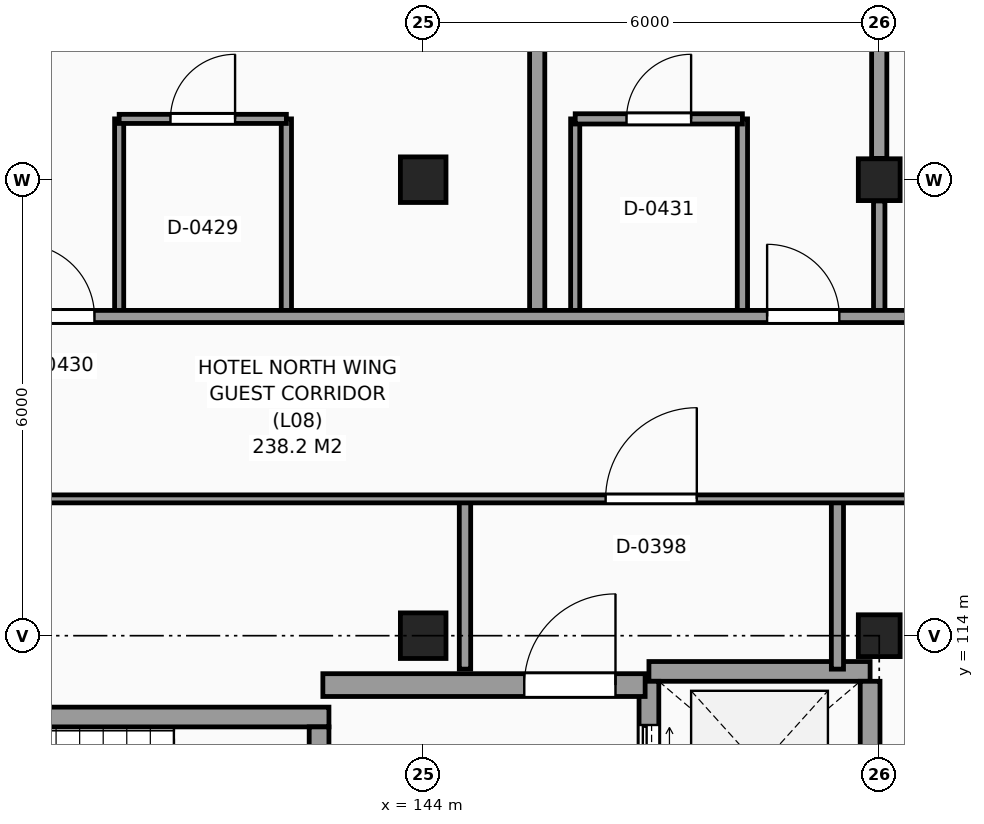
"""IFC4 building model, lengths in metres.
Left out: names, types, materials, properties, quantities, classifications, styles, units other than length and angle.
Written with IfcOpenShell. Run it as: python <this file> out.ifc"""

import sys

from ifc_helpers import new_model, si_unit, direction, frame, frame_2d, origin, origin_2d, place, context, subcontext, project, spatial, rectangle, extrude, element, fill, save


model = new_model("IFC4")
c1 = context("Model", 3, precision=1e-05, world=origin(), true_north=direction((0.0, 1.0)))
c2 = subcontext(c1, "Body", "Model", "MODEL_VIEW")
j1 = project(units=[si_unit("LENGTHUNIT", "METRE"), si_unit("PLANEANGLEUNIT", "RADIAN")], contexts=[c1])
p1 = place(None, origin())
s1 = spatial("IfcSite", under=j1, at=p1, CompositionType="ELEMENT")
p2 = place(p1, origin())
s2 = spatial("IfcBuilding", under=s1, at=p2, CompositionType="ELEMENT")
p3 = place(p2, frame((0.0, 0.0, 34.8)))
s3 = spatial("IfcBuildingStorey", under=s2, at=p3, CompositionType="ELEMENT", Elevation=34.8)
for number, where, z_axis, x_axis in (
    (1, (144.0, 114.0, 0.0), (0.0, 0.0, 1.0), (1.0, 0.0, 0.0)),
    (2, (144.0, 120.0, 0.0), (0.0, 0.0, 1.0), (1.0, 0.0, 0.0)),
):
    element("IfcColumn", number, at=place(p3, frame(where, z_axis=z_axis, x_axis=x_axis)), inside=s3, PredefinedType="COLUMN", context=c2, shape_type="SweptSolid", body=[
        extrude(rectangle(XDim=0.6, YDim=0.6, at=origin_2d()), origin(), (0.0, 0.0, 1.0), 3.3),
    ])
for number, where, z_axis, x_axis in (
    (3, (150.0, 114.0, 0.0), (0.0, 0.0, 1.0), (1.0, 0.0, 0.0)),
    (4, (150.0, 120.0, 0.0), (0.0, 0.0, 1.0), (1.0, 0.0, 0.0)),
):
    element("IfcColumn", number, at=place(p3, frame(where, z_axis=z_axis, x_axis=x_axis)), inside=s3, PredefinedType="COLUMN", context=c2, shape_type="SweptSolid", body=[
        extrude(rectangle(XDim=0.55, YDim=0.55, at=origin_2d()), origin(), (0.0, 0.0, 1.0), 3.3),
    ])
p4 = place(p3, frame((132.04, 112.93, 0.0), z_axis=(0.0, 0.0, 1.0), x_axis=(1.0, 0.0, 0.0)))
e5 = element("IfcWall", 5, at=p4, inside=s3, PredefinedType="SHEAR", context=c2, shape_type="SweptSolid", body=[
    extrude(rectangle(XDim=10.72, YDim=0.26, at=frame_2d((5.36, 0.0))), origin(), (0.0, 0.0, 1.0), 3.3),
])
p5 = place(p3, frame((142.63, 109.2, 0.0), z_axis=(0.0, 0.0, 1.0), x_axis=(0.0, 1.0, 0.0)))
e6 = element("IfcWall", 6, at=p5, inside=s3, PredefinedType="SHEAR", context=c2, shape_type="SweptSolid", body=[
    extrude(rectangle(XDim=3.6, YDim=0.26, at=frame_2d((1.8, 0.0))), origin(), (0.0, 0.0, 1.0), 3.3),
])
p6 = place(p5, frame((1.25, 0.0, 0.0)))
e7 = element("IfcOpeningElement", 7, at=p6, cuts=e6, PredefinedType="OPENING", context=c2, shape_type="SweptSolid", body=[
    extrude(rectangle(XDim=1.1, YDim=2.15, at=frame_2d((0.55, 1.075))), frame((0.0, 0.14, 0.0), z_axis=(0.0, -1.0, 0.0), x_axis=(1.0, 0.0, 0.0)), (0.0, 0.0, 1.0), 0.28),
])
p7 = place(p3, frame((146.97, 113.53, 0.0), z_axis=(0.0, 0.0, 1.0), x_axis=(1.0, 0.0, 0.0)))
e8 = element("IfcWall", 8, at=p7, inside=s3, PredefinedType="SHEAR", context=c2, shape_type="SweptSolid", body=[
    extrude(rectangle(XDim=2.91, YDim=0.26, at=frame_2d((1.455, 0.0))), origin(), (0.0, 0.0, 1.0), 3.3),
])
p8 = place(p3, frame((149.88, 111.15, 0.0), z_axis=(0.0, 0.0, 1.0), x_axis=(0.0, 1.0, 0.0)))
e9 = element("IfcWall", 9, at=p8, inside=s3, PredefinedType="SHEAR", context=c2, shape_type="SweptSolid", body=[
    extrude(rectangle(XDim=2.25, YDim=0.26, at=frame_2d((1.125, 0.0))), origin(), (0.0, 0.0, 1.0), 3.3),
])
p9 = place(p3, frame((146.97, 111.15, 0.0), z_axis=(0.0, 0.0, 1.0), x_axis=(0.0, 1.0, 0.0)))
e10 = element("IfcWall", 10, at=p9, inside=s3, PredefinedType="SHEAR", context=c2, shape_type="SweptSolid", body=[
    extrude(rectangle(XDim=2.25, YDim=0.26, at=frame_2d((1.125, 0.0))), origin(), (0.0, 0.0, 1.0), 3.3),
])
p10 = place(p9, frame((0.575, 0.0, 0.0)))
e11 = element("IfcOpeningElement", 11, at=p10, cuts=e10, PredefinedType="OPENING", context=c2, shape_type="SweptSolid", body=[
    extrude(rectangle(XDim=1.1, YDim=2.2, at=frame_2d((0.55, 1.1))), frame((0.0, 0.14, 0.0), z_axis=(0.0, -1.0, 0.0), x_axis=(1.0, 0.0, 0.0)), (0.0, 0.0, 1.0), 0.28),
])
p11 = place(p3, frame((142.68, 113.35, 0.0), z_axis=(0.0, 0.0, 1.0), x_axis=(1.0, 0.0, 0.0)))
e12 = element("IfcWall", 12, at=p11, inside=s3, PredefinedType="SHEAR", context=c2, shape_type="SweptSolid", body=[
    extrude(rectangle(XDim=4.24, YDim=0.3, at=frame_2d((2.12, 0.0))), origin(), (0.0, 0.0, 1.0), 3.3),
])
p12 = place(p11, frame((2.65, 0.0, 0.0)))
e13 = element("IfcOpeningElement", 13, at=p12, cuts=e12, PredefinedType="OPENING", context=c2, shape_type="SweptSolid", body=[
    extrude(rectangle(XDim=1.2, YDim=2.2, at=frame_2d((0.6, 1.1))), frame((0.0, 0.16, 0.0), z_axis=(0.0, -1.0, 0.0), x_axis=(1.0, 0.0, 0.0)), (0.0, 0.0, 1.0), 0.32),
])
p13 = place(p3, frame((140.0, 118.2, 0.0), z_axis=(0.0, 0.0, 1.0), x_axis=(0.0, 1.0, 0.0)))
e14 = element("IfcWall", 14, at=p13, inside=s3, PredefinedType="PARTITIONING", context=c2, shape_type="SweptSolid", body=[
    extrude(rectangle(XDim=2.6, YDim=0.12, at=frame_2d((1.3, 0.0))), origin(), (0.0, 0.0, 1.0), 3.07),
])
p14 = place(p3, frame((142.2, 118.2, 0.0), z_axis=(0.0, 0.0, 1.0), x_axis=(0.0, 1.0, 0.0)))
e15 = element("IfcWall", 15, at=p14, inside=s3, PredefinedType="PARTITIONING", context=c2, shape_type="SweptSolid", body=[
    extrude(rectangle(XDim=2.6, YDim=0.135, at=frame_2d((1.3, 0.0))), origin(), (0.0, 0.0, 1.0), 3.07),
])
p15 = place(p3, frame((144.55, 113.56, 0.0), z_axis=(0.0, 0.0, 1.0), x_axis=(0.0, 1.0, 0.0)))
e16 = element("IfcWall", 16, at=p15, inside=s3, PredefinedType="PARTITIONING", context=c2, shape_type="SweptSolid", body=[
    extrude(rectangle(XDim=2.24, YDim=0.15, at=frame_2d((1.12, 0.0))), origin(), (0.0, 0.0, 1.0), 3.07),
])
p16 = place(p3, frame((145.5, 118.2, 0.0), z_axis=(0.0, 0.0, 1.0), x_axis=(0.0, 1.0, 0.0)))
e17 = element("IfcWall", 17, at=p16, inside=s3, PredefinedType="PARTITIONING", context=c2, shape_type="SweptSolid", body=[
    extrude(rectangle(XDim=7.545, YDim=0.2, at=frame_2d((3.772, 0.0))), origin(), (0.0, 0.0, 1.0), 3.07),
])
p17 = place(p3, frame((146.0, 118.2, 0.0), z_axis=(0.0, 0.0, 1.0), x_axis=(0.0, 1.0, 0.0)))
e18 = element("IfcWall", 18, at=p17, inside=s3, PredefinedType="PARTITIONING", context=c2, shape_type="SweptSolid", body=[
    extrude(rectangle(XDim=2.6, YDim=0.12, at=frame_2d((1.3, 0.0))), origin(), (0.0, 0.0, 1.0), 3.07),
])
p18 = place(p3, frame((148.2, 118.2, 0.0), z_axis=(0.0, 0.0, 1.0), x_axis=(0.0, 1.0, 0.0)))
e19 = element("IfcWall", 19, at=p18, inside=s3, PredefinedType="PARTITIONING", context=c2, shape_type="SweptSolid", body=[
    extrude(rectangle(XDim=2.6, YDim=0.135, at=frame_2d((1.3, 0.0))), origin(), (0.0, 0.0, 1.0), 3.07),
])
p19 = place(p3, frame((149.45, 113.56, 0.0), z_axis=(0.0, 0.0, 1.0), x_axis=(0.0, 1.0, 0.0)))
e20 = element("IfcWall", 20, at=p19, inside=s3, PredefinedType="PARTITIONING", context=c2, shape_type="SweptSolid", body=[
    extrude(rectangle(XDim=2.24, YDim=0.16, at=frame_2d((1.12, 0.0))), origin(), (0.0, 0.0, 1.0), 3.07),
])
p20 = place(p3, frame((150.0, 118.2, 0.0), z_axis=(0.0, 0.0, 1.0), x_axis=(0.0, 1.0, 0.0)))
e21 = element("IfcWall", 21, at=p20, inside=s3, PredefinedType="PARTITIONING", context=c2, shape_type="SweptSolid", body=[
    extrude(rectangle(XDim=1.52, YDim=0.15, at=frame_2d((0.76, 0.0))), origin(), (0.0, 0.0, 1.0), 2.57),
])
p21 = place(p3, frame((150.0, 120.28, 0.0), z_axis=(0.0, 0.0, 1.0), x_axis=(0.0, 1.0, 0.0)))
e22 = element("IfcWall", 22, at=p21, inside=s3, PredefinedType="PARTITIONING", context=c2, shape_type="SweptSolid", body=[
    extrude(rectangle(XDim=5.44, YDim=0.2, at=frame_2d((2.72, 0.0))), origin(), (0.0, 0.0, 1.0), 2.73),
])
p22 = place(p3, frame((66.275, 115.8, 0.0), z_axis=(0.0, 0.0, 1.0), x_axis=(1.0, 0.0, 0.0)))
e23 = element("IfcWall", 23, at=p22, inside=s3, PredefinedType="PARTITIONING", context=c2, shape_type="SweptSolid", body=[
    extrude(rectangle(XDim=103.525, YDim=0.105, at=frame_2d((51.763, 0.0))), origin(), (0.0, 0.0, 1.0), 3.07),
])
p23 = place(p22, frame((80.125, 0.0, 0.0)))
e24 = element("IfcOpeningElement", 24, at=p23, cuts=e23, PredefinedType="OPENING", context=c2, shape_type="SweptSolid", body=[
    extrude(rectangle(XDim=1.2, YDim=2.2, at=frame_2d((0.6, 1.1))), frame((0.0, 0.062, 0.0), z_axis=(0.0, -1.0, 0.0), x_axis=(1.0, 0.0, 0.0)), (0.0, 0.0, 1.0), 0.125),
])
p24 = place(p22, frame((50.125, 0.0, 0.0)))
e25 = element("IfcOpeningElement", 25, at=p24, cuts=e23, PredefinedType="OPENING", context=c2, shape_type="SweptSolid", body=[
    extrude(rectangle(XDim=1.2, YDim=2.2, at=frame_2d((0.6, 1.1))), frame((0.0, 0.062, 0.0), z_axis=(0.0, -1.0, 0.0), x_axis=(1.0, 0.0, 0.0)), (0.0, 0.0, 1.0), 0.125),
])
p25 = place(p22, frame((8.975, 0.0, 0.0)))
e26 = element("IfcOpeningElement", 26, at=p25, cuts=e23, PredefinedType="OPENING", context=c2, shape_type="SweptSolid", body=[
    extrude(rectangle(XDim=1.1, YDim=2.15, at=frame_2d((0.55, 1.075))), frame((0.0, 0.062, 0.0), z_axis=(0.0, -1.0, 0.0), x_axis=(1.0, 0.0, 0.0)), (0.0, 0.0, 1.0), 0.125),
])
p26 = place(p22, frame((55.275, 0.0, 0.0)))
e27 = element("IfcOpeningElement", 27, at=p26, cuts=e23, PredefinedType="OPENING", context=c2, shape_type="SweptSolid", body=[
    extrude(rectangle(XDim=1.0, YDim=2.15, at=frame_2d((0.5, 1.075))), frame((0.0, 0.062, 0.0), z_axis=(0.0, -1.0, 0.0), x_axis=(1.0, 0.0, 0.0)), (0.0, 0.0, 1.0), 0.125),
])
p27 = place(p22, frame((62.245, 0.0, 0.0)))
e28 = element("IfcOpeningElement", 28, at=p27, cuts=e23, PredefinedType="OPENING", context=c2, shape_type="SweptSolid", body=[
    extrude(rectangle(XDim=0.96, YDim=2.15, at=frame_2d((0.48, 1.075))), frame((0.0, 0.062, 0.0), z_axis=(0.0, -1.0, 0.0), x_axis=(1.0, 0.0, 0.0)), (0.0, 0.0, 1.0), 0.125),
])
p28 = place(p22, frame((31.925, 0.0, 0.0)))
e29 = element("IfcOpeningElement", 29, at=p28, cuts=e23, PredefinedType="OPENING", context=c2, shape_type="SweptSolid", body=[
    extrude(rectangle(XDim=1.6, YDim=2.25, at=frame_2d((0.8, 1.125))), frame((0.0, 0.062, 0.0), z_axis=(0.0, -1.0, 0.0), x_axis=(1.0, 0.0, 0.0)), (0.0, 0.0, 1.0), 0.125),
])
p29 = place(p22, frame((18.55, 0.0, 0.0)))
e30 = element("IfcOpeningElement", 30, at=p29, cuts=e23, PredefinedType="OPENING", context=c2, shape_type="SweptSolid", body=[
    extrude(rectangle(XDim=0.95, YDim=2.1, at=frame_2d((0.475, 1.05))), frame((0.0, 0.062, 0.0), z_axis=(0.0, -1.0, 0.0), x_axis=(1.0, 0.0, 0.0)), (0.0, 0.0, 1.0), 0.125),
])
p30 = place(p22, frame((84.45, 0.0, 0.0)))
e31 = element("IfcOpeningElement", 31, at=p30, cuts=e23, PredefinedType="OPENING", context=c2, shape_type="SweptSolid", body=[
    extrude(rectangle(XDim=0.95, YDim=2.1, at=frame_2d((0.475, 1.05))), frame((0.0, 0.062, 0.0), z_axis=(0.0, -1.0, 0.0), x_axis=(1.0, 0.0, 0.0)), (0.0, 0.0, 1.0), 0.125),
])
p31 = place(p3, frame((66.275, 118.2, 0.0), z_axis=(0.0, 0.0, 1.0), x_axis=(1.0, 0.0, 0.0)))
e32 = element("IfcWall", 32, at=p31, inside=s3, PredefinedType="PARTITIONING", context=c2, shape_type="SweptSolid", body=[
    extrude(rectangle(XDim=110.225, YDim=0.16, at=frame_2d((55.113, 0.0))), origin(), (0.0, 0.0, 1.0), 3.07),
])
p32 = place(p31, frame((0.45, 0.0, 0.0)))
e33 = element("IfcOpeningElement", 33, at=p32, cuts=e32, PredefinedType="OPENING", context=c2, shape_type="SweptSolid", body=[
    extrude(rectangle(XDim=0.95, YDim=2.1, at=frame_2d((0.475, 1.05))), frame((0.0, 0.09, 0.0), z_axis=(0.0, -1.0, 0.0), x_axis=(1.0, 0.0, 0.0)), (0.0, 0.0, 1.0), 0.18),
])
p33 = place(p31, frame((4.85, 0.0, 0.0)))
e34 = element("IfcOpeningElement", 34, at=p33, cuts=e32, PredefinedType="OPENING", context=c2, shape_type="SweptSolid", body=[
    extrude(rectangle(XDim=0.95, YDim=2.1, at=frame_2d((0.475, 1.05))), frame((0.0, 0.09, 0.0), z_axis=(0.0, -1.0, 0.0), x_axis=(1.0, 0.0, 0.0)), (0.0, 0.0, 1.0), 0.18),
])
p34 = place(p31, frame((9.35, 0.0, 0.0)))
e35 = element("IfcOpeningElement", 35, at=p34, cuts=e32, PredefinedType="OPENING", context=c2, shape_type="SweptSolid", body=[
    extrude(rectangle(XDim=0.95, YDim=2.1, at=frame_2d((0.475, 1.05))), frame((0.0, 0.09, 0.0), z_axis=(0.0, -1.0, 0.0), x_axis=(1.0, 0.0, 0.0)), (0.0, 0.0, 1.0), 0.18),
])
p35 = place(p31, frame((18.45, 0.0, 0.0)))
e36 = element("IfcOpeningElement", 36, at=p35, cuts=e32, PredefinedType="OPENING", context=c2, shape_type="SweptSolid", body=[
    extrude(rectangle(XDim=0.95, YDim=2.1, at=frame_2d((0.475, 1.05))), frame((0.0, 0.09, 0.0), z_axis=(0.0, -1.0, 0.0), x_axis=(1.0, 0.0, 0.0)), (0.0, 0.0, 1.0), 0.18),
])
p36 = place(p31, frame((22.85, 0.0, 0.0)))
e37 = element("IfcOpeningElement", 37, at=p36, cuts=e32, PredefinedType="OPENING", context=c2, shape_type="SweptSolid", body=[
    extrude(rectangle(XDim=0.95, YDim=2.1, at=frame_2d((0.475, 1.05))), frame((0.0, 0.09, 0.0), z_axis=(0.0, -1.0, 0.0), x_axis=(1.0, 0.0, 0.0)), (0.0, 0.0, 1.0), 0.18),
])
p37 = place(p31, frame((27.35, 0.0, 0.0)))
e38 = element("IfcOpeningElement", 38, at=p37, cuts=e32, PredefinedType="OPENING", context=c2, shape_type="SweptSolid", body=[
    extrude(rectangle(XDim=0.95, YDim=2.1, at=frame_2d((0.475, 1.05))), frame((0.0, 0.09, 0.0), z_axis=(0.0, -1.0, 0.0), x_axis=(1.0, 0.0, 0.0)), (0.0, 0.0, 1.0), 0.18),
])
p38 = place(p31, frame((42.05, 0.0, 0.0)))
e39 = element("IfcOpeningElement", 39, at=p38, cuts=e32, PredefinedType="OPENING", context=c2, shape_type="SweptSolid", body=[
    extrude(rectangle(XDim=0.95, YDim=2.1, at=frame_2d((0.475, 1.05))), frame((0.0, 0.09, 0.0), z_axis=(0.0, -1.0, 0.0), x_axis=(1.0, 0.0, 0.0)), (0.0, 0.0, 1.0), 0.18),
])
p39 = place(p31, frame((50.3, 0.0, 0.0)))
e40 = element("IfcOpeningElement", 40, at=p39, cuts=e32, PredefinedType="OPENING", context=c2, shape_type="SweptSolid", body=[
    extrude(rectangle(XDim=0.95, YDim=2.1, at=frame_2d((0.475, 1.05))), frame((0.0, 0.09, 0.0), z_axis=(0.0, -1.0, 0.0), x_axis=(1.0, 0.0, 0.0)), (0.0, 0.0, 1.0), 0.18),
])
p40 = place(p31, frame((52.85, 0.0, 0.0)))
e41 = element("IfcOpeningElement", 41, at=p40, cuts=e32, PredefinedType="OPENING", context=c2, shape_type="SweptSolid", body=[
    extrude(rectangle(XDim=0.95, YDim=2.1, at=frame_2d((0.475, 1.05))), frame((0.0, 0.09, 0.0), z_axis=(0.0, -1.0, 0.0), x_axis=(1.0, 0.0, 0.0)), (0.0, 0.0, 1.0), 0.18),
])
p41 = place(p31, frame((60.05, 0.0, 0.0)))
e42 = element("IfcOpeningElement", 42, at=p41, cuts=e32, PredefinedType="OPENING", context=c2, shape_type="SweptSolid", body=[
    extrude(rectangle(XDim=0.95, YDim=2.1, at=frame_2d((0.475, 1.05))), frame((0.0, 0.09, 0.0), z_axis=(0.0, -1.0, 0.0), x_axis=(1.0, 0.0, 0.0)), (0.0, 0.0, 1.0), 0.18),
])
p42 = place(p31, frame((64.25, 0.0, 0.0)))
e43 = element("IfcOpeningElement", 43, at=p42, cuts=e32, PredefinedType="OPENING", context=c2, shape_type="SweptSolid", body=[
    extrude(rectangle(XDim=0.95, YDim=2.1, at=frame_2d((0.475, 1.05))), frame((0.0, 0.09, 0.0), z_axis=(0.0, -1.0, 0.0), x_axis=(1.0, 0.0, 0.0)), (0.0, 0.0, 1.0), 0.18),
])
p43 = place(p31, frame((66.45, 0.0, 0.0)))
e44 = element("IfcOpeningElement", 44, at=p43, cuts=e32, PredefinedType="OPENING", context=c2, shape_type="SweptSolid", body=[
    extrude(rectangle(XDim=0.95, YDim=2.1, at=frame_2d((0.475, 1.05))), frame((0.0, 0.09, 0.0), z_axis=(0.0, -1.0, 0.0), x_axis=(1.0, 0.0, 0.0)), (0.0, 0.0, 1.0), 0.18),
])
p44 = place(p31, frame((72.45, 0.0, 0.0)))
e45 = element("IfcOpeningElement", 45, at=p44, cuts=e32, PredefinedType="OPENING", context=c2, shape_type="SweptSolid", body=[
    extrude(rectangle(XDim=0.95, YDim=2.1, at=frame_2d((0.475, 1.05))), frame((0.0, 0.09, 0.0), z_axis=(0.0, -1.0, 0.0), x_axis=(1.0, 0.0, 0.0)), (0.0, 0.0, 1.0), 0.18),
])
p45 = place(p31, frame((82.25, 0.0, 0.0)))
e46 = element("IfcOpeningElement", 46, at=p45, cuts=e32, PredefinedType="OPENING", context=c2, shape_type="SweptSolid", body=[
    extrude(rectangle(XDim=0.95, YDim=2.1, at=frame_2d((0.475, 1.05))), frame((0.0, 0.09, 0.0), z_axis=(0.0, -1.0, 0.0), x_axis=(1.0, 0.0, 0.0)), (0.0, 0.0, 1.0), 0.18),
])
p46 = place(p31, frame((84.45, 0.0, 0.0)))
e47 = element("IfcOpeningElement", 47, at=p46, cuts=e32, PredefinedType="OPENING", context=c2, shape_type="SweptSolid", body=[
    extrude(rectangle(XDim=0.95, YDim=2.1, at=frame_2d((0.475, 1.05))), frame((0.0, 0.09, 0.0), z_axis=(0.0, -1.0, 0.0), x_axis=(1.0, 0.0, 0.0)), (0.0, 0.0, 1.0), 0.18),
])
p47 = place(p31, frame((88.85, 0.0, 0.0)))
e48 = element("IfcOpeningElement", 48, at=p47, cuts=e32, PredefinedType="OPENING", context=c2, shape_type="SweptSolid", body=[
    extrude(rectangle(XDim=0.95, YDim=2.1, at=frame_2d((0.475, 1.05))), frame((0.0, 0.09, 0.0), z_axis=(0.0, -1.0, 0.0), x_axis=(1.0, 0.0, 0.0)), (0.0, 0.0, 1.0), 0.18),
])
p48 = place(p31, frame((96.05, 0.0, 0.0)))
e49 = element("IfcOpeningElement", 49, at=p48, cuts=e32, PredefinedType="OPENING", context=c2, shape_type="SweptSolid", body=[
    extrude(rectangle(XDim=0.95, YDim=2.1, at=frame_2d((0.475, 1.05))), frame((0.0, 0.09, 0.0), z_axis=(0.0, -1.0, 0.0), x_axis=(1.0, 0.0, 0.0)), (0.0, 0.0, 1.0), 0.18),
])
p49 = place(p31, frame((104.3, 0.0, 0.0)))
e50 = element("IfcOpeningElement", 50, at=p49, cuts=e32, PredefinedType="OPENING", context=c2, shape_type="SweptSolid", body=[
    extrude(rectangle(XDim=0.95, YDim=2.1, at=frame_2d((0.475, 1.05))), frame((0.0, 0.09, 0.0), z_axis=(0.0, -1.0, 0.0), x_axis=(1.0, 0.0, 0.0)), (0.0, 0.0, 1.0), 0.18),
])
p50 = place(p31, frame((108.45, 0.0, 0.0)))
e51 = element("IfcOpeningElement", 51, at=p50, cuts=e32, PredefinedType="OPENING", context=c2, shape_type="SweptSolid", body=[
    extrude(rectangle(XDim=0.95, YDim=2.1, at=frame_2d((0.475, 1.05))), frame((0.0, 0.09, 0.0), z_axis=(0.0, -1.0, 0.0), x_axis=(1.0, 0.0, 0.0)), (0.0, 0.0, 1.0), 0.18),
])
p51 = place(p3, frame((140.0, 120.8, 0.0), z_axis=(0.0, 0.0, 1.0), x_axis=(1.0, 0.0, 0.0)))
e52 = element("IfcWall", 52, at=p51, inside=s3, PredefinedType="PARTITIONING", context=c2, shape_type="SweptSolid", body=[
    extrude(rectangle(XDim=2.2, YDim=0.12, at=frame_2d((1.1, 0.0))), origin(), (0.0, 0.0, 1.0), 3.07),
])
p52 = place(p51, frame((0.675, 0.0, 0.0)))
e53 = element("IfcOpeningElement", 53, at=p52, cuts=e52, PredefinedType="OPENING", context=c2, shape_type="SweptSolid", body=[
    extrude(rectangle(XDim=0.85, YDim=2.1, at=frame_2d((0.425, 1.05))), frame((0.0, 0.07, 0.0), z_axis=(0.0, -1.0, 0.0), x_axis=(1.0, 0.0, 0.0)), (0.0, 0.0, 1.0), 0.14),
])
p53 = place(p3, frame((146.0, 120.8, 0.0), z_axis=(0.0, 0.0, 1.0), x_axis=(1.0, 0.0, 0.0)))
e54 = element("IfcWall", 54, at=p53, inside=s3, PredefinedType="PARTITIONING", context=c2, shape_type="SweptSolid", body=[
    extrude(rectangle(XDim=2.2, YDim=0.135, at=frame_2d((1.1, 0.0))), origin(), (0.0, 0.0, 1.0), 3.07),
])
p54 = place(p53, frame((0.675, 0.0, 0.0)))
e55 = element("IfcOpeningElement", 55, at=p54, cuts=e54, PredefinedType="OPENING", context=c2, shape_type="SweptSolid", body=[
    extrude(rectangle(XDim=0.85, YDim=2.1, at=frame_2d((0.425, 1.05))), frame((0.0, 0.078, 0.0), z_axis=(0.0, -1.0, 0.0), x_axis=(1.0, 0.0, 0.0)), (0.0, 0.0, 1.0), 0.155),
])
p55 = place(p10, origin())
e56 = element("IfcDoor", 56, at=p55, inside=s3, OperationType="DOUBLE_DOOR_SLIDING", PredefinedType="DOOR", context=c2, shape_type="SweptSolid", body=[
    extrude(rectangle(XDim=1.1, YDim=2.2, at=frame_2d((0.55, 1.1))), frame((0.0, 0.025, 0.0), z_axis=(0.0, -1.0, 0.0), x_axis=(1.0, 0.0, 0.0)), (0.0, 0.0, 1.0), 0.05),
])
fill(e11, e56)
p56 = place(p12, origin())
e57 = element("IfcDoor", 57, at=p56, inside=s3, OperationType="SINGLE_SWING_RIGHT", PredefinedType="DOOR", context=c2, shape_type="SweptSolid", body=[
    extrude(rectangle(XDim=1.2, YDim=2.2, at=frame_2d((0.6, 1.1))), frame((0.0, 0.025, 0.0), z_axis=(0.0, -1.0, 0.0), x_axis=(1.0, 0.0, 0.0)), (0.0, 0.0, 1.0), 0.05),
])
fill(e13, e57)
p57 = place(p23, origin())
e58 = element("IfcDoor", 58, at=p57, inside=s3, OperationType="SINGLE_SWING_RIGHT", PredefinedType="DOOR", context=c2, shape_type="SweptSolid", body=[
    extrude(rectangle(XDim=1.2, YDim=2.2, at=frame_2d((0.6, 1.1))), frame((0.0, 0.025, 0.0), z_axis=(0.0, -1.0, 0.0), x_axis=(1.0, 0.0, 0.0)), (0.0, 0.0, 1.0), 0.05),
])
fill(e24, e58)
p58 = place(p52, origin())
e59 = element("IfcDoor", 59, at=p58, inside=s3, OperationType="SINGLE_SWING_RIGHT", PredefinedType="DOOR", context=c2, shape_type="SweptSolid", body=[
    extrude(rectangle(XDim=0.85, YDim=2.1, at=frame_2d((0.425, 1.05))), frame((0.0, 0.025, 0.0), z_axis=(0.0, -1.0, 0.0), x_axis=(1.0, 0.0, 0.0)), (0.0, 0.0, 1.0), 0.05),
])
fill(e53, e59)
p59 = place(p44, origin())
e60 = element("IfcDoor", 60, at=p59, inside=s3, OperationType="SINGLE_SWING_LEFT", PredefinedType="DOOR", context=c2, shape_type="SweptSolid", body=[
    extrude(rectangle(XDim=0.95, YDim=2.1, at=frame_2d((0.475, 1.05))), frame((0.0, 0.025, 0.0), z_axis=(0.0, -1.0, 0.0), x_axis=(1.0, 0.0, 0.0)), (0.0, 0.0, 1.0), 0.05),
])
fill(e45, e60)
p60 = place(p54, origin())
e61 = element("IfcDoor", 61, at=p60, inside=s3, OperationType="SINGLE_SWING_RIGHT", PredefinedType="DOOR", context=c2, shape_type="SweptSolid", body=[
    extrude(rectangle(XDim=0.85, YDim=2.1, at=frame_2d((0.425, 1.05))), frame((0.0, 0.025, 0.0), z_axis=(0.0, -1.0, 0.0), x_axis=(1.0, 0.0, 0.0)), (0.0, 0.0, 1.0), 0.05),
])
fill(e55, e61)
p61 = place(p45, origin())
e62 = element("IfcDoor", 62, at=p61, inside=s3, OperationType="SINGLE_SWING_LEFT", PredefinedType="DOOR", context=c2, shape_type="SweptSolid", body=[
    extrude(rectangle(XDim=0.95, YDim=2.1, at=frame_2d((0.475, 1.05))), frame((0.0, 0.025, 0.0), z_axis=(0.0, -1.0, 0.0), x_axis=(1.0, 0.0, 0.0)), (0.0, 0.0, 1.0), 0.05),
])
fill(e46, e62)
save(model, sys.argv[1])
